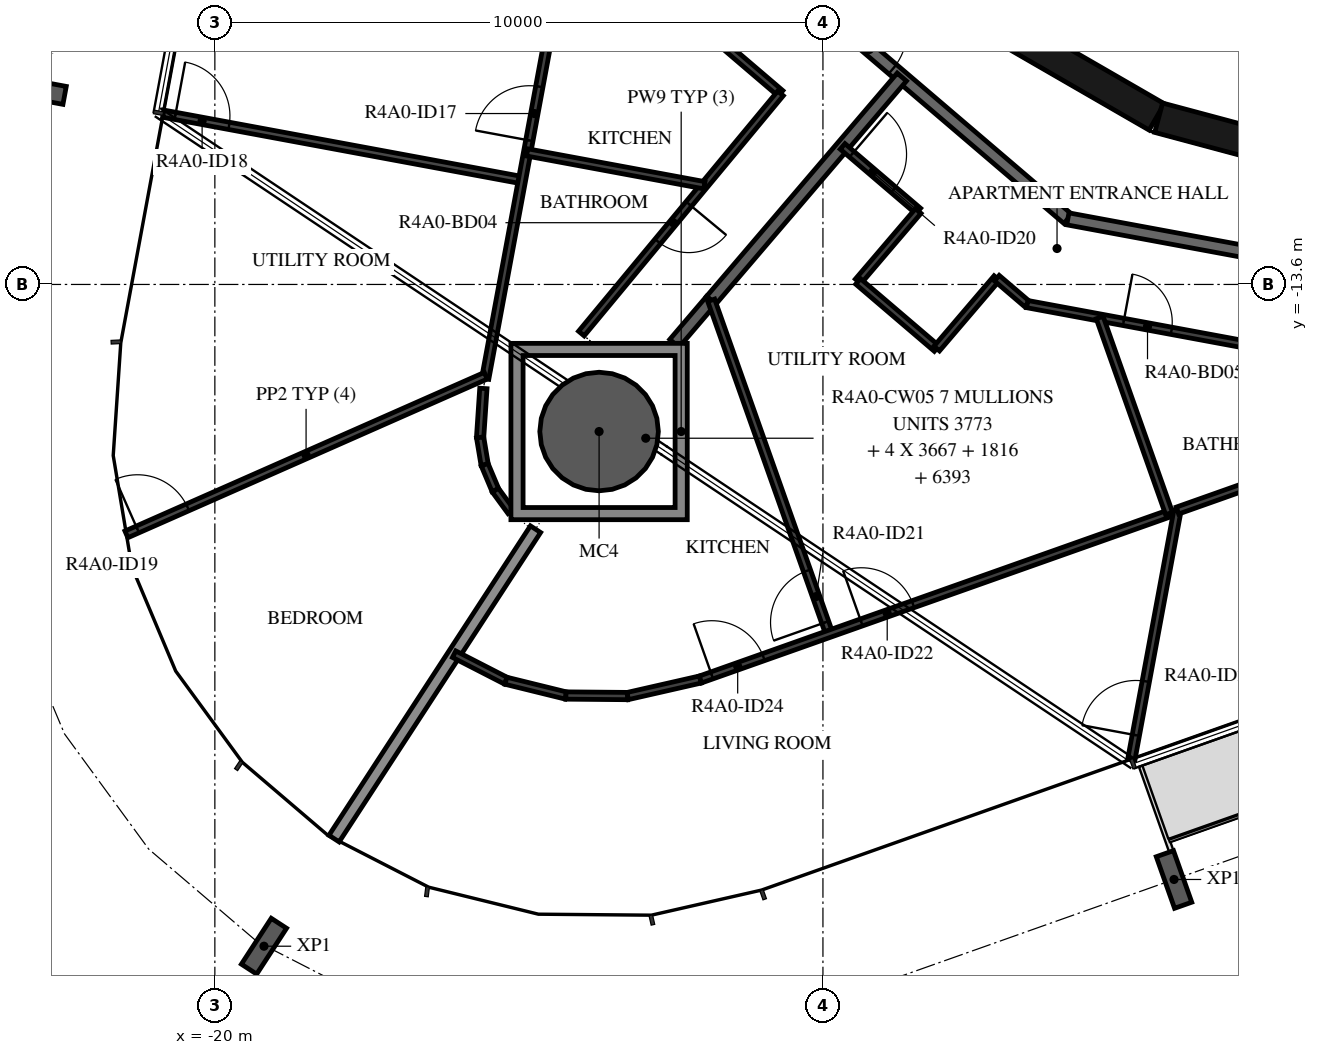
"""IFC4 building model, lengths in metres.
Left out: names, types, materials, properties, quantities, classifications, styles, units other than length and angle.
Written with IfcOpenShell. Run it as: python <this file> out.ifc"""

import sys

from ifc_helpers import new_model, si_unit, direction, frame, frame_2d, origin, origin_2d, place, context, subcontext, project, spatial, polyline, rectangle, hollow_circle, i_section, outline, extrude, element, fill, save


model = new_model("IFC4")
c1 = context("Model", 3, precision=1e-05, world=origin(), true_north=direction((0.0, 1.0)))
c2 = subcontext(c1, "Body", "Model", "MODEL_VIEW")
j1 = project(units=[si_unit("LENGTHUNIT", "METRE"), si_unit("PLANEANGLEUNIT", "RADIAN")], contexts=[c1])
p1 = place(None, origin())
s1 = spatial("IfcSite", under=j1, at=p1, CompositionType="ELEMENT")
p2 = place(p1, origin())
s2 = spatial("IfcBuilding", under=s1, at=p2, CompositionType="ELEMENT")
p3 = place(p2, frame((0.0, 0.0, 158.7)))
s3 = spatial("IfcBuildingStorey", under=s2, at=p3, CompositionType="ELEMENT", Elevation=158.7)
p4 = place(p3, frame((-13.681, -16.019, -0.38), z_axis=(0.0, 0.0, 1.0), x_axis=(1.0, 0.0, 0.0)))
e1 = element("IfcColumn", 1, at=p4, inside=s3, PredefinedType="COLUMN", context=c2, shape_type="SweptSolid", body=[
    extrude(hollow_circle(Radius=0.975, WallThickness=0.045, at=origin_2d()), origin(), (0.0, 0.0, 1.0), 3.5),
])
for number, where, z_axis, x_axis in (
    (2, (-22.914, -10.409, -0.38), (0.0, 0.0, 1.0), (0.182, 0.983, 0.0)),
    (3, (-19.192, -24.483, -0.38), (0.0, 0.0, 1.0), (-0.838, 0.546, 0.0)),
    (4, (-4.226, -23.385, -0.38), (0.0, 0.0, 1.0), (-0.943, -0.334, 0.0)),
):
    element("IfcColumn", number, at=place(p3, frame(where, z_axis=z_axis, x_axis=x_axis)), inside=s3, PredefinedType="COLUMN", context=c2, shape_type="SweptSolid", body=[
        extrude(i_section(OverallWidth=0.3, OverallDepth=0.9, WebThickness=0.019, FlangeThickness=0.035, FilletRadius=0.03, at=origin_2d()), origin(), (0.0, 0.0, 1.0), 3.5),
    ])
for number, where, z_axis, x_axis in (
    (5, (-7.137, -9.329, 0.0), (0.0, 0.0, 1.0), (0.866, -0.5, 0.0)),
    (6, (-4.479, -10.858, 0.0), (0.0, 0.0, 1.0), (0.966, -0.259, 0.0)),
):
    element("IfcWall", number, at=place(p3, frame(where, z_axis=z_axis, x_axis=x_axis)), inside=s3, PredefinedType="SHEAR", context=c2, shape_type="SweptSolid", body=[
        extrude(rectangle(XDim=3.033, YDim=0.5, at=frame_2d((1.516, 0.0))), origin(), (0.0, 0.0, 1.0), 3.12),
    ])
p5 = place(p3, frame((-11.433, -7.858, 0.0), z_axis=(0.0, 0.0, 1.0), x_axis=(0.760412154545, -0.649440801937, 0.0)))
e7 = element("IfcWall", 7, at=p5, inside=s3, PredefinedType="STANDARD", context=c2, shape_type="SweptSolid", body=[
    extrude(rectangle(XDim=7.181, YDim=0.2, at=frame_2d((3.59, 0.0))), origin(), (0.0, 0.0, 1.0), 3.12),
])
p6 = place(p5, frame((2.39, 0.0, 0.0)))
e8 = element("IfcOpeningElement", 8, at=p6, cuts=e7, PredefinedType="OPENING", context=c2, shape_type="SweptSolid", body=[
    extrude(rectangle(XDim=1.0, YDim=2.1, at=frame_2d((0.5, 1.05))), frame((0.0, 0.11, 0.0), z_axis=(0.0, -1.0, 0.0), x_axis=(1.0, 0.0, 0.0)), (0.0, 0.0, 1.0), 0.22),
])
p7 = place(p3, frame((-5.972, -12.521, 0.0), z_axis=(0.0, 0.0, 1.0), x_axis=(0.983256068163, -0.18222926335, 0.0)))
e9 = element("IfcWall", 9, at=p7, inside=s3, PredefinedType="STANDARD", context=c2, shape_type="SweptSolid", body=[
    extrude(rectangle(XDim=7.181, YDim=0.2, at=frame_2d((3.59, 0.0))), origin(), (0.0, 0.0, 1.0), 3.12),
])
p8 = place(p7, frame((4.7, 0.0, 0.0)))
e10 = element("IfcOpeningElement", 10, at=p8, cuts=e9, PredefinedType="OPENING", context=c2, shape_type="SweptSolid", body=[
    extrude(rectangle(XDim=1.0, YDim=2.1, at=frame_2d((0.5, 1.05))), frame((0.0, 0.11, 0.0), z_axis=(0.0, -1.0, 0.0), x_axis=(1.0, 0.0, 0.0)), (0.0, 0.0, 1.0), 0.22),
])
p9 = place(p3, frame((-11.838, -13.86, 0.0), z_axis=(0.0, 0.0, 1.0), x_axis=(0.64944503311, 0.760408540831, 0.0)))
e11 = element("IfcWall", 11, at=p9, inside=s3, PredefinedType="STANDARD", context=c2, shape_type="SweptSolid", body=[
    extrude(rectangle(XDim=4.827, YDim=0.2, at=frame_2d((2.414, 0.0))), origin(), (0.0, 0.0, 1.0), 3.12),
])
p10 = place(p3, frame((-12.443, -14.569, 0.0), z_axis=(0.0, 0.0, 1.0), x_axis=(0.649517408851, 0.760346720648, 0.0)))
e12 = element("IfcWall", 12, at=p10, inside=s3, PredefinedType="STANDARD", context=c2, shape_type="SweptSolid", body=[
    extrude(rectangle(XDim=0.932, YDim=0.2, at=frame_2d((0.466, 0.0))), origin(), (0.0, 0.0, 1.0), 3.12),
])
p11 = place(p3, frame((-18.04, -22.713, 0.0), z_axis=(0.0, 0.0, 1.0), x_axis=(0.545629831617, 0.83802630439, 0.0)))
e13 = element("IfcWall", 13, at=p11, inside=s3, PredefinedType="STANDARD", context=c2, shape_type="SweptSolid", body=[
    extrude(rectangle(XDim=6.072, YDim=0.2, at=frame_2d((3.036, 0.0))), origin(), (0.0, 0.0, 1.0), 2.73),
])
p12 = place(p3, frame((-12.713, -8.737, 0.0), z_axis=(0.0, 0.0, 1.0), x_axis=(0.760400223405, -0.649454771517, 0.0)))
e14 = element("IfcWall", 14, at=p12, inside=s3, PredefinedType="PARTITIONING", context=c2, shape_type="SweptSolid", body=[
    extrude(rectangle(XDim=2.649, YDim=0.12, at=frame_2d((1.325, 0.0))), origin(), (0.0, 0.0, 1.0), 3.12),
])
p13 = place(p3, frame((-10.698, -10.458, 0.0), z_axis=(0.0, 0.0, 1.0), x_axis=(-0.63830561059, -0.769783052223, 0.0)))
e15 = element("IfcWall", 15, at=p13, inside=s3, PredefinedType="PARTITIONING", context=c2, shape_type="SweptSolid", body=[
    extrude(rectangle(XDim=5.131, YDim=0.12, at=frame_2d((2.565, 0.0))), origin(), (0.0, 0.0, 1.0), 3.12),
])
p14 = place(p13, frame((2.363, 0.0, 0.0)))
e16 = element("IfcOpeningElement", 16, at=p14, cuts=e15, PredefinedType="OPENING", context=c2, shape_type="SweptSolid", body=[
    extrude(rectangle(XDim=0.8, YDim=2.1, at=frame_2d((0.4, 1.05))), frame((0.0, 0.07, 0.0), z_axis=(0.0, -1.0, 0.0), x_axis=(1.0, 0.0, 0.0)), (0.0, 0.0, 1.0), 0.14),
])
p15 = place(p3, frame((-20.849, -10.792, 0.0), z_axis=(0.0, 0.0, 1.0), x_axis=(0.983251500113, -0.182253909494, 0.0)))
e17 = element("IfcWall", 17, at=p15, inside=s3, PredefinedType="PARTITIONING", context=c2, shape_type="SweptSolid", body=[
    extrude(rectangle(XDim=6.0, YDim=0.12, at=frame_2d((3.0, 0.0))), origin(), (0.0, 0.0, 1.0), 2.73),
])
p16 = place(p15, frame((0.2, 0.0, 0.0)))
e18 = element("IfcOpeningElement", 18, at=p16, cuts=e17, PredefinedType="OPENING", context=c2, shape_type="SweptSolid", body=[
    extrude(rectangle(XDim=0.9, YDim=2.1, at=frame_2d((0.45, 1.05))), frame((0.0, 0.07, 0.0), z_axis=(0.0, -1.0, 0.0), x_axis=(1.0, 0.0, 0.0)), (0.0, 0.0, 1.0), 0.14),
])
p17 = place(p3, frame((-15.554, -15.149, 0.0), z_axis=(0.0, 0.0, 1.0), x_axis=(0.182237116667, 0.983254612656, 0.0)))
e19 = element("IfcWall", 19, at=p17, inside=s3, PredefinedType="PARTITIONING", context=c2, shape_type="SweptSolid", body=[
    extrude(rectangle(XDim=9.638, YDim=0.12, at=frame_2d((4.819, 0.0))), origin(), (0.0, 0.0, 1.0), 3.12),
])
p18 = place(p17, frame((3.984, 0.0, 0.0)))
e20 = element("IfcOpeningElement", 20, at=p18, cuts=e19, PredefinedType="OPENING", context=c2, shape_type="SweptSolid", body=[
    extrude(rectangle(XDim=0.9, YDim=2.1, at=frame_2d((0.45, 1.05))), frame((0.0, 0.07, 0.0), z_axis=(0.0, -1.0, 0.0), x_axis=(1.0, 0.0, 0.0)), (0.0, 0.0, 1.0), 0.14),
])
p19 = place(p3, frame((-21.455, -17.71, 0.0), z_axis=(0.0, 0.0, 1.0), x_axis=(0.914829518237, 0.403840256243, 0.0)))
e21 = element("IfcWall", 21, at=p19, inside=s3, PredefinedType="PARTITIONING", context=c2, shape_type="SweptSolid", body=[
    extrude(rectangle(XDim=6.459, YDim=0.12, at=frame_2d((3.23, 0.0))), origin(), (0.0, 0.0, 1.0), 2.73),
])
p20 = place(p19, frame((0.2, 0.0, 0.0)))
e22 = element("IfcOpeningElement", 22, at=p20, cuts=e21, PredefinedType="OPENING", context=c2, shape_type="SweptSolid", body=[
    extrude(rectangle(XDim=0.9, YDim=2.1, at=frame_2d((0.45, 1.05))), frame((0.0, 0.07, 0.0), z_axis=(0.0, -1.0, 0.0), x_axis=(1.0, 0.0, 0.0)), (0.0, 0.0, 1.0), 0.14),
])
p21 = place(p3, frame((-14.865, -11.428, 0.0), z_axis=(0.0, 0.0, 1.0), x_axis=(0.983255224962, -0.182233812955, 0.0)))
e23 = element("IfcWall", 23, at=p21, inside=s3, PredefinedType="PARTITIONING", context=c2, shape_type="SweptSolid", body=[
    extrude(rectangle(XDim=2.963, YDim=0.12, at=frame_2d((1.482, 0.0))), origin(), (0.0, 0.0, 1.0), 3.12),
])
p22 = place(p3, frame((-15.584, -15.311, 0.0), z_axis=(0.0, 0.0, 1.0), x_axis=(-0.066880551605, -0.997760989324, 0.0)))
e24 = element("IfcWall", 24, at=p22, inside=s3, PredefinedType="PARTITIONING", context=c2, shape_type="SweptSolid", body=[
    extrude(rectangle(XDim=0.807, YDim=0.12, at=frame_2d((0.403, 0.0))), origin(), (0.0, 0.0, 1.0), 3.12),
])
for number, where, z_axis, x_axis in (
    (25, (-15.638, -16.115, 0.0), (0.0, 0.0, 1.0), (0.165, -0.986, 0.0)),
    (26, (-15.563, -16.564, 0.0), (0.0, 0.0, 1.0), (0.389, -0.921, 0.0)),
):
    element("IfcWall", number, at=place(p3, frame(where, z_axis=z_axis, x_axis=x_axis)), inside=s3, PredefinedType="PARTITIONING", context=c2, shape_type="SweptSolid", body=[
        extrude(rectangle(XDim=0.455, YDim=0.12, at=frame_2d((0.228, 0.0))), origin(), (0.0, 0.0, 1.0), 3.12),
    ])
p23 = place(p3, frame((-15.386, -16.983, 0.0), z_axis=(0.0, 0.0, 1.0), x_axis=(0.590016589342, -0.807391122258, 0.0)))
e27 = element("IfcWall", 27, at=p23, inside=s3, PredefinedType="PARTITIONING", context=c2, shape_type="SweptSolid", body=[
    extrude(rectangle(XDim=0.432, YDim=0.12, at=frame_2d((0.216, 0.0))), origin(), (0.0, 0.0, 1.0), 3.12),
])
p24 = place(p3, frame((-9.677, -11.33, 0.0), z_axis=(0.0, 0.0, 1.0), x_axis=(0.760372142735, -0.649487647729, 0.0)))
e28 = element("IfcWall", 28, at=p24, inside=s3, PredefinedType="PARTITIONING", context=c2, shape_type="SweptSolid", body=[
    extrude(rectangle(XDim=1.636, YDim=0.12, at=frame_2d((0.818, 0.0))), origin(), (0.0, 0.0, 1.0), 3.12),
])
p25 = place(p24, frame((0.2, 0.0, 0.0)))
e29 = element("IfcOpeningElement", 29, at=p25, cuts=e28, PredefinedType="OPENING", context=c2, shape_type="SweptSolid", body=[
    extrude(rectangle(XDim=0.9, YDim=2.1, at=frame_2d((0.45, 1.05))), frame((0.0, 0.07, 0.0), z_axis=(0.0, -1.0, 0.0), x_axis=(1.0, 0.0, 0.0)), (0.0, 0.0, 1.0), 0.14),
])
p26 = place(p3, frame((-8.433, -12.393, 0.0), z_axis=(0.0, 0.0, 1.0), x_axis=(-0.649443355674, -0.760409973482, 0.0)))
e30 = element("IfcWall", 30, at=p26, inside=s3, PredefinedType="PARTITIONING", context=c2, shape_type="SweptSolid", body=[
    extrude(rectangle(XDim=1.522, YDim=0.12, at=frame_2d((0.761, 0.0))), origin(), (0.0, 0.0, 1.0), 3.12),
])
p27 = place(p3, frame((-9.422, -13.55, 0.0), z_axis=(0.0, 0.0, 1.0), x_axis=(0.760431300628, -0.649418383652, 0.0)))
e31 = element("IfcWall", 31, at=p27, inside=s3, PredefinedType="PARTITIONING", context=c2, shape_type="SweptSolid", body=[
    extrude(rectangle(XDim=1.7, YDim=0.12, at=frame_2d((0.85, 0.0))), origin(), (0.0, 0.0, 1.0), 3.12),
])
p28 = place(p3, frame((-8.129, -14.654, 0.0), z_axis=(0.0, 0.0, 1.0), x_axis=(0.649443355674, 0.760409973482, 0.0)))
e32 = element("IfcWall", 32, at=p28, inside=s3, PredefinedType="PARTITIONING", context=c2, shape_type="SweptSolid", body=[
    extrude(rectangle(XDim=1.522, YDim=0.12, at=frame_2d((0.761, 0.0))), origin(), (0.0, 0.0, 1.0), 3.12),
])
p29 = place(p3, frame((-7.14, -13.497, 0.0), z_axis=(0.0, 0.0, 1.0), x_axis=(0.760515230334, -0.649320093967, 0.0)))
e33 = element("IfcWall", 33, at=p29, inside=s3, PredefinedType="PARTITIONING", context=c2, shape_type="SweptSolid", body=[
    extrude(rectangle(XDim=0.656, YDim=0.12, at=frame_2d((0.328, 0.0))), origin(), (0.0, 0.0, 1.0), 3.12),
])
p30 = place(p3, frame((-6.641, -13.923, 0.0), z_axis=(0.0, 0.0, 1.0), x_axis=(0.983250157272, -0.182261153912, 0.0)))
e34 = element("IfcWall", 34, at=p30, inside=s3, PredefinedType="PARTITIONING", context=c2, shape_type="SweptSolid", body=[
    extrude(rectangle(XDim=7.985, YDim=0.12, at=frame_2d((3.992, 0.0))), origin(), (0.0, 0.0, 1.0), 3.12),
])
p31 = place(p30, frame((1.612, 0.0, 0.0)))
e35 = element("IfcOpeningElement", 35, at=p31, cuts=e34, PredefinedType="OPENING", context=c2, shape_type="SweptSolid", body=[
    extrude(rectangle(XDim=0.8, YDim=2.1, at=frame_2d((0.4, 1.05))), frame((0.0, 0.07, 0.0), z_axis=(0.0, -1.0, 0.0), x_axis=(1.0, 0.0, 0.0)), (0.0, 0.0, 1.0), 0.14),
])
p32 = place(p3, frame((-9.895, -19.346, 0.0), z_axis=(0.0, 0.0, 1.0), x_axis=(-0.333781129158, 0.942650602195, 0.0)))
e36 = element("IfcWall", 36, at=p32, inside=s3, PredefinedType="PARTITIONING", context=c2, shape_type="SweptSolid", body=[
    extrude(rectangle(XDim=5.819, YDim=0.12, at=frame_2d((2.91, 0.0))), origin(), (0.0, 0.0, 1.0), 3.12),
])
p33 = place(p32, frame((0.2, 0.0, 0.0)))
e37 = element("IfcOpeningElement", 37, at=p33, cuts=e36, PredefinedType="OPENING", context=c2, shape_type="SweptSolid", body=[
    extrude(rectangle(XDim=0.9, YDim=2.1, at=frame_2d((0.45, 1.05))), frame((0.0, 0.07, 0.0), z_axis=(0.0, -1.0, 0.0), x_axis=(1.0, 0.0, 0.0)), (0.0, 0.0, 1.0), 0.14),
])
p34 = place(p3, frame((-16.065, -19.68, 0.0), z_axis=(0.0, 0.0, 1.0), x_axis=(0.889684645268, -0.456575549033, 0.0)))
e38 = element("IfcWall", 38, at=p34, inside=s3, PredefinedType="PARTITIONING", context=c2, shape_type="SweptSolid", body=[
    extrude(rectangle(XDim=0.957, YDim=0.12, at=frame_2d((0.479, 0.0))), origin(), (0.0, 0.0, 1.0), 3.12),
])
p35 = place(p3, frame((-15.214, -20.117, 0.0), z_axis=(0.0, 0.0, 1.0), x_axis=(0.970998575146, -0.239085271534, 0.0)))
e39 = element("IfcWall", 39, at=p35, inside=s3, PredefinedType="PARTITIONING", context=c2, shape_type="SweptSolid", body=[
    extrude(rectangle(XDim=1.016, YDim=0.12, at=frame_2d((0.508, 0.0))), origin(), (0.0, 0.0, 1.0), 3.12),
])
p36 = place(p3, frame((-14.227, -20.36, 0.0), z_axis=(0.0, 0.0, 1.0), x_axis=(0.999960467683, -0.008891741722, 0.0)))
e40 = element("IfcWall", 40, at=p36, inside=s3, PredefinedType="PARTITIONING", context=c2, shape_type="SweptSolid", body=[
    extrude(rectangle(XDim=1.016, YDim=0.12, at=frame_2d((0.508, 0.0))), origin(), (0.0, 0.0, 1.0), 3.12),
])
p37 = place(p3, frame((-13.211, -20.369, 0.0), z_axis=(0.0, 0.0, 1.0), x_axis=(0.974997834831, 0.222214360642, 0.0)))
e41 = element("IfcWall", 41, at=p37, inside=s3, PredefinedType="PARTITIONING", context=c2, shape_type="SweptSolid", body=[
    extrude(rectangle(XDim=1.227, YDim=0.12, at=frame_2d((0.614, 0.0))), origin(), (0.0, 0.0, 1.0), 3.12),
])
p38 = place(p3, frame((-12.015, -20.096, 0.0), z_axis=(0.0, 0.0, 1.0), x_axis=(0.942638718556, 0.333814688531, 0.0)))
e42 = element("IfcWall", 42, at=p38, inside=s3, PredefinedType="PARTITIONING", context=c2, shape_type="SweptSolid", body=[
    extrude(rectangle(XDim=8.216, YDim=0.12, at=frame_2d((4.108, 0.0))), origin(), (0.0, 0.0, 1.0), 3.12),
])
p39 = place(p38, frame((2.809, 0.0, 0.0)))
e43 = element("IfcOpeningElement", 43, at=p39, cuts=e42, PredefinedType="OPENING", context=c2, shape_type="SweptSolid", body=[
    extrude(rectangle(XDim=0.9, YDim=2.1, at=frame_2d((0.45, 1.05))), frame((0.0, 0.07, 0.0), z_axis=(0.0, -1.0, 0.0), x_axis=(1.0, 0.0, 0.0)), (0.0, 0.0, 1.0), 0.14),
])
p40 = place(p38, frame((0.2, 0.0, 0.0)))
e44 = element("IfcOpeningElement", 44, at=p40, cuts=e42, PredefinedType="OPENING", context=c2, shape_type="SweptSolid", body=[
    extrude(rectangle(XDim=0.9, YDim=2.1, at=frame_2d((0.45, 1.05))), frame((0.0, 0.07, 0.0), z_axis=(0.0, -1.0, 0.0), x_axis=(1.0, 0.0, 0.0)), (0.0, 0.0, 1.0), 0.14),
])
p41 = place(p3, frame((-4.308, -17.367, 0.0), z_axis=(0.0, 0.0, 1.0), x_axis=(-0.333802202677, 0.942643140052, 0.0)))
e45 = element("IfcWall", 45, at=p41, inside=s3, PredefinedType="PARTITIONING", context=c2, shape_type="SweptSolid", body=[
    extrude(rectangle(XDim=3.419, YDim=0.12, at=frame_2d((1.709, 0.0))), origin(), (0.0, 0.0, 1.0), 3.12),
])
p42 = place(p3, frame((-4.927, -21.406, 0.0), z_axis=(0.0, 0.0, 1.0), x_axis=(0.182238575099, 0.983254342348, 0.0)))
e46 = element("IfcWall", 46, at=p42, inside=s3, PredefinedType="PARTITIONING", context=c2, shape_type="SweptSolid", body=[
    extrude(rectangle(XDim=4.157, YDim=0.12, at=frame_2d((2.079, 0.0))), origin(), (0.0, 0.0, 1.0), 3.12),
])
p43 = place(p42, frame((0.4, 0.0, 0.0)))
e47 = element("IfcOpeningElement", 47, at=p43, cuts=e46, PredefinedType="OPENING", context=c2, shape_type="SweptSolid", body=[
    extrude(rectangle(XDim=0.9, YDim=2.1, at=frame_2d((0.45, 1.05))), frame((0.0, 0.07, 0.0), z_axis=(0.0, -1.0, 0.0), x_axis=(1.0, 0.0, 0.0)), (0.0, 0.0, 1.0), 0.14),
])
p44 = place(p3, frame((-4.17, -17.318, 0.0), z_axis=(0.0, 0.0, 1.0), x_axis=(0.942641343532, 0.333807275931, 0.0)))
e48 = element("IfcWall", 48, at=p44, inside=s3, PredefinedType="PARTITIONING", context=c2, shape_type="SweptSolid", body=[
    extrude(rectangle(XDim=5.781, YDim=0.12, at=frame_2d((2.891, 0.0))), origin(), (0.0, 0.0, 1.0), 3.12),
])
p45 = place(p3, origin())
e49 = element("IfcWall", 49, at=p45, inside=s3, PredefinedType="STANDARD", context=c2, shape_type="SweptSolid", body=[
    extrude(outline(polyline([(-12.231, -14.569), (-12.231, -17.469), (-15.131, -17.469), (-15.131, -14.569), (-12.231, -14.569)]), holes=[polyline([(-14.931, -17.269), (-12.431, -17.269), (-12.431, -14.769), (-14.931, -14.769), (-14.931, -17.269)])]), origin(), (0.0, 0.0, 1.0), 3.12),
])
p46 = place(p6, origin())
e50 = element("IfcDoor", 50, at=p46, inside=s3, OperationType="SINGLE_SWING_RIGHT", PredefinedType="DOOR", context=c2, shape_type="SweptSolid", body=[
    extrude(rectangle(XDim=1.0, YDim=2.1, at=frame_2d((0.5, 1.05))), frame((0.0, 0.025, 0.0), z_axis=(0.0, -1.0, 0.0), x_axis=(1.0, 0.0, 0.0)), (0.0, 0.0, 1.0), 0.05),
])
fill(e8, e50)
p47 = place(p14, origin())
e51 = element("IfcDoor", 51, at=p47, inside=s3, OperationType="SINGLE_SWING_RIGHT", PredefinedType="DOOR", context=c2, shape_type="SweptSolid", body=[
    extrude(rectangle(XDim=0.8, YDim=2.1, at=frame_2d((0.4, 1.05))), frame((0.0, 0.025, 0.0), z_axis=(0.0, -1.0, 0.0), x_axis=(1.0, 0.0, 0.0)), (0.0, 0.0, 1.0), 0.05),
])
fill(e16, e51)
p48 = place(p18, origin())
e52 = element("IfcDoor", 52, at=p48, inside=s3, OperationType="SINGLE_SWING_RIGHT", PredefinedType="DOOR", context=c2, shape_type="SweptSolid", body=[
    extrude(rectangle(XDim=0.9, YDim=2.1, at=frame_2d((0.45, 1.05))), frame((0.0, 0.025, 0.0), z_axis=(0.0, -1.0, 0.0), x_axis=(1.0, 0.0, 0.0)), (0.0, 0.0, 1.0), 0.05),
])
fill(e20, e52)
p49 = place(p16, origin())
e53 = element("IfcDoor", 53, at=p49, inside=s3, OperationType="SINGLE_SWING_RIGHT", PredefinedType="DOOR", context=c2, shape_type="SweptSolid", body=[
    extrude(rectangle(XDim=0.9, YDim=2.1, at=frame_2d((0.45, 1.05))), frame((0.0, 0.025, 0.0), z_axis=(0.0, -1.0, 0.0), x_axis=(1.0, 0.0, 0.0)), (0.0, 0.0, 1.0), 0.05),
])
fill(e18, e53)
p50 = place(p20, origin())
e54 = element("IfcDoor", 54, at=p50, inside=s3, OperationType="SINGLE_SWING_RIGHT", PredefinedType="DOOR", context=c2, shape_type="SweptSolid", body=[
    extrude(rectangle(XDim=0.9, YDim=2.1, at=frame_2d((0.45, 1.05))), frame((0.0, 0.025, 0.0), z_axis=(0.0, -1.0, 0.0), x_axis=(1.0, 0.0, 0.0)), (0.0, 0.0, 1.0), 0.05),
])
fill(e22, e54)
p51 = place(p25, origin())
e55 = element("IfcDoor", 55, at=p51, inside=s3, OperationType="SINGLE_SWING_LEFT", PredefinedType="DOOR", context=c2, shape_type="SweptSolid", body=[
    extrude(rectangle(XDim=0.9, YDim=2.1, at=frame_2d((0.45, 1.05))), frame((0.0, 0.025, 0.0), z_axis=(0.0, -1.0, 0.0), x_axis=(1.0, 0.0, 0.0)), (0.0, 0.0, 1.0), 0.05),
])
fill(e29, e55)
p52 = place(p31, origin())
e56 = element("IfcDoor", 56, at=p52, inside=s3, OperationType="SINGLE_SWING_LEFT", PredefinedType="DOOR", context=c2, shape_type="SweptSolid", body=[
    extrude(rectangle(XDim=0.8, YDim=2.1, at=frame_2d((0.4, 1.05))), frame((0.0, 0.025, 0.0), z_axis=(0.0, -1.0, 0.0), x_axis=(1.0, 0.0, 0.0)), (0.0, 0.0, 1.0), 0.05),
])
fill(e35, e56)
p53 = place(p33, origin())
e57 = element("IfcDoor", 57, at=p53, inside=s3, OperationType="SINGLE_SWING_LEFT", PredefinedType="DOOR", context=c2, shape_type="SweptSolid", body=[
    extrude(rectangle(XDim=0.9, YDim=2.1, at=frame_2d((0.45, 1.05))), frame((0.0, 0.025, 0.0), z_axis=(0.0, -1.0, 0.0), x_axis=(1.0, 0.0, 0.0)), (0.0, 0.0, 1.0), 0.05),
])
fill(e37, e57)
p54 = place(p39, origin())
e58 = element("IfcDoor", 58, at=p54, inside=s3, OperationType="SINGLE_SWING_LEFT", PredefinedType="DOOR", context=c2, shape_type="SweptSolid", body=[
    extrude(rectangle(XDim=0.9, YDim=2.1, at=frame_2d((0.45, 1.05))), frame((0.0, 0.025, 0.0), z_axis=(0.0, -1.0, 0.0), x_axis=(1.0, 0.0, 0.0)), (0.0, 0.0, 1.0), 0.05),
])
fill(e43, e58)
p55 = place(p43, origin())
e59 = element("IfcDoor", 59, at=p55, inside=s3, OperationType="SINGLE_SWING_RIGHT", PredefinedType="DOOR", context=c2, shape_type="SweptSolid", body=[
    extrude(rectangle(XDim=0.9, YDim=2.1, at=frame_2d((0.45, 1.05))), frame((0.0, 0.025, 0.0), z_axis=(0.0, -1.0, 0.0), x_axis=(1.0, 0.0, 0.0)), (0.0, 0.0, 1.0), 0.05),
])
fill(e47, e59)
p56 = place(p40, origin())
e60 = element("IfcDoor", 60, at=p56, inside=s3, OperationType="SINGLE_SWING_LEFT", PredefinedType="DOOR", context=c2, shape_type="SweptSolid", body=[
    extrude(rectangle(XDim=0.9, YDim=2.1, at=frame_2d((0.45, 1.05))), frame((0.0, 0.025, 0.0), z_axis=(0.0, -1.0, 0.0), x_axis=(1.0, 0.0, 0.0)), (0.0, 0.0, 1.0), 0.05),
])
fill(e44, e60)
save(model, sys.argv[1])
